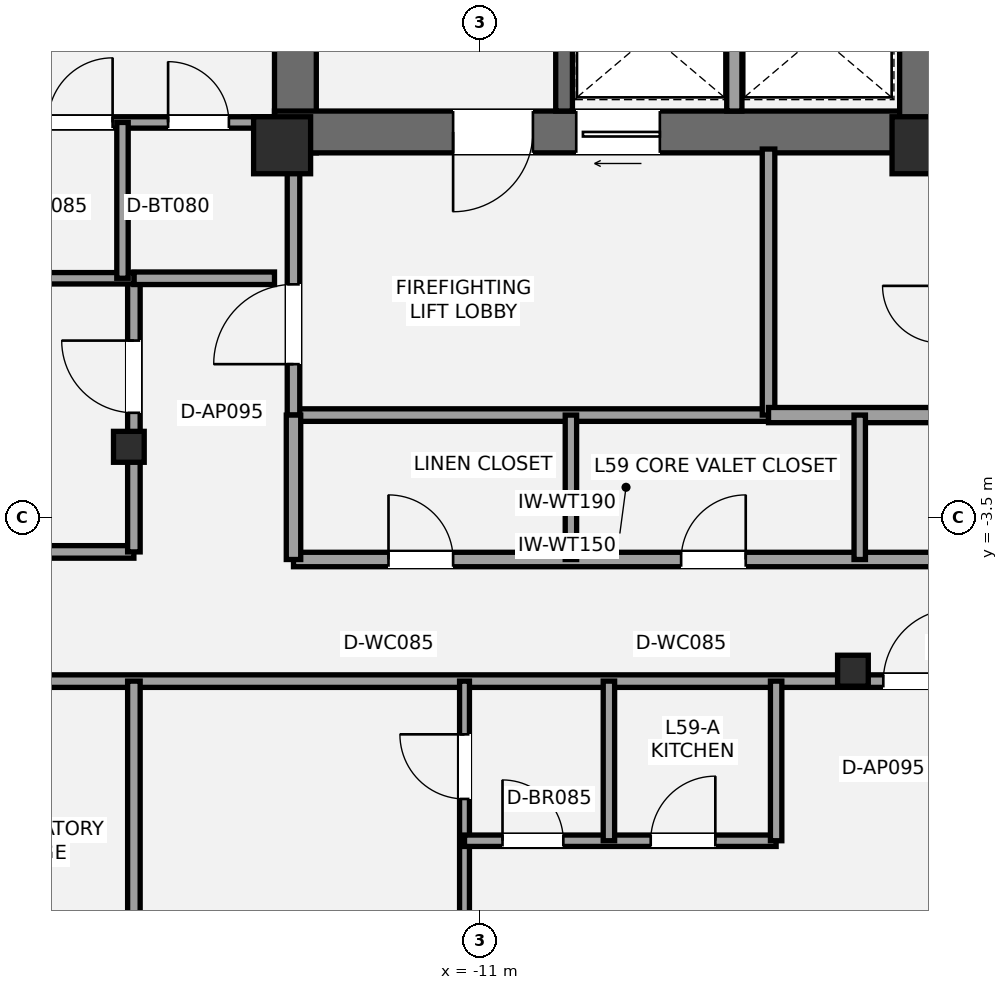
"""IFC4 building model, lengths in metres.
Left out: names, types, materials, properties, quantities, classifications, styles, units other than length and angle.
Written with IfcOpenShell. Run it as: python <this file> out.ifc"""

import sys

from ifc_helpers import new_model, si_unit, direction, frame, frame_2d, origin, origin_2d, place, context, subcontext, project, spatial, rectangle, i_section, extrude, element, fill, save


model = new_model("IFC4")
c1 = context("Model", 3, precision=1e-05, world=origin(), true_north=direction((0.0, 1.0)))
c2 = subcontext(c1, "Body", "Model", "MODEL_VIEW")
j1 = project(units=[si_unit("LENGTHUNIT", "METRE"), si_unit("PLANEANGLEUNIT", "RADIAN")], contexts=[c1])
p1 = place(None, origin())
s1 = spatial("IfcSite", under=j1, at=p1, CompositionType="ELEMENT")
p2 = place(p1, origin())
s2 = spatial("IfcBuilding", under=s1, at=p2, CompositionType="ELEMENT")
p3 = place(p2, frame((0.0, 0.0, 213.15)))
s3 = spatial("IfcBuildingStorey", under=s2, at=p3, CompositionType="ELEMENT", Elevation=213.15)
p4 = place(p3, frame((-13.425, 1.3, 0.0), z_axis=(0.0, 0.0, 1.0), x_axis=(0.0, 1.0, 0.0)))
e1 = element("IfcWall", 1, at=p4, inside=s3, PredefinedType="SHEAR", context=c2, shape_type="SweptSolid", body=[
    extrude(rectangle(XDim=8.25, YDim=0.55, at=frame_2d((4.125, 0.0))), origin(), (0.0, 0.0, 1.0), 3.15),
])
p5 = place(p3, frame((-4.925, 1.575, 0.0), z_axis=(0.0, 0.0, 1.0), x_axis=(-1.0, 0.0, 0.0)))
e2 = element("IfcWall", 2, at=p5, inside=s3, PredefinedType="SHEAR", context=c2, shape_type="SweptSolid", body=[
    extrude(rectangle(XDim=8.775, YDim=0.55, at=frame_2d((4.387, 0.0))), origin(), (0.0, 0.0, 1.0), 3.15),
])
p6 = place(p5, frame((5.375, 0.0, 0.0)))
e3 = element("IfcOpeningElement", 3, at=p6, cuts=e2, PredefinedType="OPENING", context=c2, shape_type="SweptSolid", body=[
    extrude(rectangle(XDim=1.05, YDim=2.15, at=frame_2d((0.525, 1.075))), frame((0.0, 0.285, 0.0), z_axis=(0.0, -1.0, 0.0), x_axis=(1.0, 0.0, 0.0)), (0.0, 0.0, 1.0), 0.57),
])
p7 = place(p5, frame((3.705, 0.0, 0.0)))
e4 = element("IfcOpeningElement", 4, at=p7, cuts=e2, PredefinedType="OPENING", context=c2, shape_type="SweptSolid", body=[
    extrude(rectangle(XDim=1.1, YDim=2.2, at=frame_2d((0.55, 1.1))), frame((0.0, 0.285, 0.0), z_axis=(0.0, -1.0, 0.0), x_axis=(1.0, 0.0, 0.0)), (0.0, 0.0, 1.0), 0.57),
])
p8 = place(p3, frame((-5.2, 1.3, 0.0), z_axis=(0.0, 0.0, 1.0), x_axis=(0.0, 1.0, 0.0)))
e5 = element("IfcWall", 5, at=p8, inside=s3, PredefinedType="SHEAR", context=c2, shape_type="SweptSolid", body=[
    extrude(rectangle(XDim=2.5, YDim=0.55, at=frame_2d((1.25, 0.0))), origin(), (0.0, 0.0, 1.0), 3.15),
])
p9 = place(p3, frame((-9.89, 1.85, 0.0), z_axis=(0.0, 0.0, 1.0), x_axis=(0.0, 1.0, 0.0)))
e6 = element("IfcWall", 6, at=p9, inside=s3, PredefinedType="SHEAR", context=c2, shape_type="SweptSolid", body=[
    extrude(rectangle(XDim=7.15, YDim=0.22, at=frame_2d((3.575, 0.0))), origin(), (0.0, 0.0, 1.0), 3.15),
])
for number, where, z_axis, x_axis in (
    (7, (-13.6, 1.4, 0.0), (0.0, 0.0, 1.0), (1.0, 0.0, 0.0)),
    (8, (-5.2, 1.4, 0.0), (0.0, 0.0, 1.0), (1.0, 0.0, 0.0)),
):
    element("IfcColumn", number, at=place(p3, frame(where, z_axis=z_axis, x_axis=x_axis)), inside=s3, PredefinedType="PILASTER", context=c2, shape_type="SweptSolid", body=[
        extrude(rectangle(XDim=0.75, YDim=0.75, at=origin_2d()), origin(), (0.0, 0.0, 1.0), 3.15),
    ])
for number, where, z_axis, x_axis in (
    (9, (-15.616, -2.567, 0.0), (0.0, 0.0, 1.0), (1.0, 0.0, 0.0)),
    (10, (-6.09, -5.513, 0.0), (0.0, 0.0, 1.0), (1.0, 0.0, 0.0)),
):
    element("IfcColumn", number, at=place(p3, frame(where, z_axis=z_axis, x_axis=x_axis)), inside=s3, PredefinedType="COLUMN", context=c2, shape_type="SweptSolid", body=[
        extrude(i_section(OverallWidth=0.404, OverallDepth=0.407, WebThickness=0.027, FlangeThickness=0.044, at=origin_2d()), origin(), (0.0, 0.0, 1.0), 3.15),
    ])
p10 = place(p3, frame((-13.45, -2.15, 0.0), z_axis=(0.0, 0.0, 1.0), x_axis=(1.0, 0.0, 0.0)))
e11 = element("IfcWall", 11, at=p10, inside=s3, PredefinedType="PARTITIONING", context=c2, shape_type="SweptSolid", body=[
    extrude(rectangle(XDim=6.25, YDim=0.165, at=frame_2d((3.125, 0.0))), origin(), (0.0, 0.0, 1.0), 2.423),
])
p11 = place(p3, frame((-13.45, -2.15, 0.0), z_axis=(0.0, 0.0, 1.0), x_axis=(0.0, 1.0, 0.0)))
e12 = element("IfcWall", 12, at=p11, inside=s3, PredefinedType="PARTITIONING", context=c2, shape_type="SweptSolid", body=[
    extrude(rectangle(XDim=3.5, YDim=0.165, at=frame_2d((1.75, 0.0))), origin(), (0.0, 0.0, 1.0), 2.423),
])
p12 = place(p11, frame((0.67, 0.0, 0.0)))
e13 = element("IfcOpeningElement", 13, at=p12, cuts=e12, PredefinedType="OPENING", context=c2, shape_type="SweptSolid", body=[
    extrude(rectangle(XDim=1.05, YDim=2.15, at=frame_2d((0.525, 1.075))), frame((0.0, 0.093, 0.0), z_axis=(0.0, -1.0, 0.0), x_axis=(1.0, 0.0, 0.0)), (0.0, 0.0, 1.0), 0.185),
])
p13 = place(p3, frame((-7.2, -2.15, 0.0), z_axis=(0.0, 0.0, 1.0), x_axis=(0.0, 1.0, 0.0)))
e14 = element("IfcWall", 14, at=p13, inside=s3, PredefinedType="PARTITIONING", context=c2, shape_type="SweptSolid", body=[
    extrude(rectangle(XDim=3.5, YDim=0.165, at=frame_2d((1.75, 0.0))), origin(), (0.0, 0.0, 1.0), 2.423),
])
p14 = place(p3, frame((-7.2, -2.15, 0.0), z_axis=(0.0, 0.0, 1.0), x_axis=(1.0, 0.0, 0.0)))
e15 = element("IfcWall", 15, at=p14, inside=s3, PredefinedType="SOLIDWALL", context=c2, shape_type="SweptSolid", body=[
    extrude(rectangle(XDim=2.25, YDim=0.2, at=frame_2d((1.125, 0.0))), origin(), (0.0, 0.0, 1.0), 2.423),
])
p15 = place(p3, frame((-7.65, 1.85, 0.0), z_axis=(0.0, 0.0, 1.0), x_axis=(0.0, 1.0, 0.0)))
e16 = element("IfcWall", 16, at=p15, inside=s3, PredefinedType="SOLIDWALL", context=c2, shape_type="SweptSolid", body=[
    extrude(rectangle(XDim=1.93, YDim=0.2, at=frame_2d((0.965, 0.0))), origin(), (0.0, 0.0, 1.0), 2.97),
])
p16 = place(p3, frame((-13.45, -4.05, 0.0), z_axis=(0.0, 0.0, 1.0), x_axis=(1.0, 0.0, 0.0)))
e17 = element("IfcWall", 17, at=p16, inside=s3, PredefinedType="PLUMBINGWALL", context=c2, shape_type="SweptSolid", body=[
    extrude(rectangle(XDim=11.35, YDim=0.19, at=frame_2d((5.675, 0.0))), origin(), (0.0, 0.0, 1.0), 2.357),
])
p17 = place(p16, frame((1.25, 0.0, 0.0)))
e18 = element("IfcOpeningElement", 18, at=p17, cuts=e17, PredefinedType="OPENING", context=c2, shape_type="SweptSolid", body=[
    extrude(rectangle(XDim=0.85, YDim=2.1, at=frame_2d((0.425, 1.05))), frame((0.0, 0.105, 0.0), z_axis=(0.0, -1.0, 0.0), x_axis=(1.0, 0.0, 0.0)), (0.0, 0.0, 1.0), 0.21),
])
p18 = place(p16, frame((5.1, 0.0, 0.0)))
e19 = element("IfcOpeningElement", 19, at=p18, cuts=e17, PredefinedType="OPENING", context=c2, shape_type="SweptSolid", body=[
    extrude(rectangle(XDim=0.85, YDim=2.1, at=frame_2d((0.425, 1.05))), frame((0.0, 0.105, 0.0), z_axis=(0.0, -1.0, 0.0), x_axis=(1.0, 0.0, 0.0)), (0.0, 0.0, 1.0), 0.21),
])
p19 = place(p16, frame((8.95, 0.0, 0.0)))
e20 = element("IfcOpeningElement", 20, at=p19, cuts=e17, PredefinedType="OPENING", context=c2, shape_type="SweptSolid", body=[
    extrude(rectangle(XDim=0.95, YDim=2.15, at=frame_2d((0.475, 1.075))), frame((0.0, 0.105, 0.0), z_axis=(0.0, -1.0, 0.0), x_axis=(1.0, 0.0, 0.0)), (0.0, 0.0, 1.0), 0.21),
])
p20 = place(p3, frame((-13.45, -4.05, 0.0), z_axis=(0.0, 0.0, 1.0), x_axis=(0.0, 1.0, 0.0)))
e21 = element("IfcWall", 21, at=p20, inside=s3, PredefinedType="PLUMBINGWALL", context=c2, shape_type="SweptSolid", body=[
    extrude(rectangle(XDim=1.9, YDim=0.19, at=frame_2d((0.95, 0.0))), origin(), (0.0, 0.0, 1.0), 2.423),
])
p21 = place(p3, frame((-9.8, -4.05, 0.0), z_axis=(0.0, 0.0, 1.0), x_axis=(0.0, 1.0, 0.0)))
e22 = element("IfcWall", 22, at=p21, inside=s3, PredefinedType="PLUMBINGWALL", context=c2, shape_type="SweptSolid", body=[
    extrude(rectangle(XDim=1.9, YDim=0.15, at=frame_2d((0.95, 0.0))), origin(), (0.0, 0.0, 1.0), 2.97),
])
p22 = place(p3, frame((-6.0, -4.05, 0.0), z_axis=(0.0, 0.0, 1.0), x_axis=(0.0, 1.0, 0.0)))
e23 = element("IfcWall", 23, at=p22, inside=s3, PredefinedType="PLUMBINGWALL", context=c2, shape_type="SweptSolid", body=[
    extrude(rectangle(XDim=1.9, YDim=0.15, at=frame_2d((0.95, 0.0))), origin(), (0.0, 0.0, 1.0), 2.423),
])
p23 = place(p3, frame((-20.71, -5.65, 0.0), z_axis=(0.0, 0.0, 1.0), x_axis=(1.0, 0.0, 0.0)))
e24 = element("IfcWall", 24, at=p23, inside=s3, PredefinedType="PARTITIONING", context=c2, shape_type="SweptSolid", body=[
    extrude(rectangle(XDim=41.42, YDim=0.165, at=frame_2d((20.71, 0.0))), origin(), (0.0, 0.0, 1.0), 2.357),
])
p24 = place(p23, frame((1.587, 0.0, 0.0)))
e25 = element("IfcOpeningElement", 25, at=p24, cuts=e24, PredefinedType="OPENING", context=c2, shape_type="SweptSolid", body=[
    extrude(rectangle(XDim=1.0, YDim=2.15, at=frame_2d((0.5, 1.075))), frame((0.0, 0.093, 0.0), z_axis=(0.0, -1.0, 0.0), x_axis=(1.0, 0.0, 0.0)), (0.0, 0.0, 1.0), 0.185),
])
p25 = place(p23, frame((38.833, 0.0, 0.0)))
e26 = element("IfcOpeningElement", 26, at=p25, cuts=e24, PredefinedType="OPENING", context=c2, shape_type="SweptSolid", body=[
    extrude(rectangle(XDim=1.0, YDim=2.15, at=frame_2d((0.5, 1.075))), frame((0.0, 0.093, 0.0), z_axis=(0.0, -1.0, 0.0), x_axis=(1.0, 0.0, 0.0)), (0.0, 0.0, 1.0), 0.185),
])
p26 = place(p23, frame((15.02, 0.0, 0.0)))
e27 = element("IfcOpeningElement", 27, at=p26, cuts=e24, PredefinedType="OPENING", context=c2, shape_type="SweptSolid", body=[
    extrude(rectangle(XDim=0.95, YDim=2.15, at=frame_2d((0.475, 1.075))), frame((0.0, 0.093, 0.0), z_axis=(0.0, -1.0, 0.0), x_axis=(1.0, 0.0, 0.0)), (0.0, 0.0, 1.0), 0.185),
])
p27 = place(p23, frame((28.61, 0.0, 0.0)))
e28 = element("IfcOpeningElement", 28, at=p27, cuts=e24, PredefinedType="OPENING", context=c2, shape_type="SweptSolid", body=[
    extrude(rectangle(XDim=0.95, YDim=2.15, at=frame_2d((0.475, 1.075))), frame((0.0, 0.093, 0.0), z_axis=(0.0, -1.0, 0.0), x_axis=(1.0, 0.0, 0.0)), (0.0, 0.0, 1.0), 0.185),
])
p28 = place(p3, frame((-22.026, -3.95, 0.0), z_axis=(0.0, 0.0, 1.0), x_axis=(1.0, 0.0, 0.0)))
e29 = element("IfcWall", 29, at=p28, inside=s3, PredefinedType="PARTITIONING", context=c2, shape_type="SweptSolid", body=[
    extrude(rectangle(XDim=6.476, YDim=0.165, at=frame_2d((3.238, 0.0))), origin(), (0.0, 0.0, 1.0), 2.423),
])
p29 = place(p3, frame((-15.55, -3.95, 0.0), z_axis=(0.0, 0.0, 1.0), x_axis=(0.0, 1.0, 0.0)))
e30 = element("IfcWall", 30, at=p29, inside=s3, PredefinedType="PARTITIONING", context=c2, shape_type="SweptSolid", body=[
    extrude(rectangle(XDim=3.6, YDim=0.165, at=frame_2d((1.8, 0.0))), origin(), (0.0, 0.0, 1.0), 2.357),
])
p30 = place(p29, frame((1.83, 0.0, 0.0)))
e31 = element("IfcOpeningElement", 31, at=p30, cuts=e30, PredefinedType="OPENING", context=c2, shape_type="SweptSolid", body=[
    extrude(rectangle(XDim=0.95, YDim=2.15, at=frame_2d((0.475, 1.075))), frame((0.0, 0.093, 0.0), z_axis=(0.0, -1.0, 0.0), x_axis=(1.0, 0.0, 0.0)), (0.0, 0.0, 1.0), 0.185),
])
p31 = place(p3, frame((-15.55, -0.35, 0.0), z_axis=(0.0, 0.0, 1.0), x_axis=(1.0, 0.0, 0.0)))
e32 = element("IfcWall", 32, at=p31, inside=s3, PredefinedType="PARTITIONING", context=c2, shape_type="SweptSolid", body=[
    extrude(rectangle(XDim=1.85, YDim=0.165, at=frame_2d((0.925, 0.0))), origin(), (0.0, 0.0, 1.0), 2.423),
])
p32 = place(p3, frame((-15.55, -10.024, 0.0), z_axis=(0.0, 0.0, 1.0), x_axis=(0.0, 1.0, 0.0)))
e33 = element("IfcWall", 33, at=p32, inside=s3, PredefinedType="PARTITIONING", context=c2, shape_type="SweptSolid", body=[
    extrude(rectangle(XDim=4.374, YDim=0.165, at=frame_2d((2.187, 0.0))), origin(), (0.0, 0.0, 1.0), 2.423),
])
p33 = place(p3, frame((-11.2, -12.696, 0.0), z_axis=(0.0, 0.0, 1.0), x_axis=(0.0, 1.0, 0.0)))
e34 = element("IfcWall", 34, at=p33, inside=s3, PredefinedType="PARTITIONING", context=c2, shape_type="SweptSolid", body=[
    extrude(rectangle(XDim=7.046, YDim=0.13, at=frame_2d((3.523, 0.0))), origin(), (0.0, 0.0, 1.0), 2.423),
])
p34 = place(p33, frame((5.496, 0.0, 0.0)))
e35 = element("IfcOpeningElement", 35, at=p34, cuts=e34, PredefinedType="OPENING", context=c2, shape_type="SweptSolid", body=[
    extrude(rectangle(XDim=0.85, YDim=2.1, at=frame_2d((0.425, 1.05))), frame((0.0, 0.075, 0.0), z_axis=(0.0, -1.0, 0.0), x_axis=(1.0, 0.0, 0.0)), (0.0, 0.0, 1.0), 0.15),
])
p35 = place(p3, frame((-11.2, -7.75, 0.0), z_axis=(0.0, 0.0, 1.0), x_axis=(1.0, 0.0, 0.0)))
e36 = element("IfcWall", 36, at=p35, inside=s3, PredefinedType="PLUMBINGWALL", context=c2, shape_type="SweptSolid", body=[
    extrude(rectangle(XDim=4.1, YDim=0.15, at=frame_2d((2.05, 0.0))), origin(), (0.0, 0.0, 1.0), 2.423),
])
p36 = place(p35, frame((0.5, 0.0, 0.0)))
e37 = element("IfcOpeningElement", 37, at=p36, cuts=e36, PredefinedType="OPENING", context=c2, shape_type="SweptSolid", body=[
    extrude(rectangle(XDim=0.8, YDim=2.1, at=frame_2d((0.4, 1.05))), frame((0.0, 0.085, 0.0), z_axis=(0.0, -1.0, 0.0), x_axis=(1.0, 0.0, 0.0)), (0.0, 0.0, 1.0), 0.17),
])
p37 = place(p35, frame((2.45, 0.0, 0.0)))
e38 = element("IfcOpeningElement", 38, at=p37, cuts=e36, PredefinedType="OPENING", context=c2, shape_type="SweptSolid", body=[
    extrude(rectangle(XDim=0.85, YDim=2.1, at=frame_2d((0.425, 1.05))), frame((0.0, 0.085, 0.0), z_axis=(0.0, -1.0, 0.0), x_axis=(1.0, 0.0, 0.0)), (0.0, 0.0, 1.0), 0.17),
])
p38 = place(p3, frame((-9.3, -7.75, 0.0), z_axis=(0.0, 0.0, 1.0), x_axis=(0.0, 1.0, 0.0)))
e39 = element("IfcWall", 39, at=p38, inside=s3, PredefinedType="PLUMBINGWALL", context=c2, shape_type="SweptSolid", body=[
    extrude(rectangle(XDim=2.1, YDim=0.15, at=frame_2d((1.05, 0.0))), origin(), (0.0, 0.0, 1.0), 2.97),
])
p39 = place(p3, frame((-7.1, -7.75, 0.0), z_axis=(0.0, 0.0, 1.0), x_axis=(0.0, 1.0, 0.0)))
e40 = element("IfcWall", 40, at=p39, inside=s3, PredefinedType="PLUMBINGWALL", context=c2, shape_type="SweptSolid", body=[
    extrude(rectangle(XDim=2.1, YDim=0.15, at=frame_2d((1.05, 0.0))), origin(), (0.0, 0.0, 1.0), 2.423),
])
p40 = place(p3, frame((-17.95, 1.7, 0.0), z_axis=(0.0, 0.0, 1.0), x_axis=(1.0, 0.0, 0.0)))
e41 = element("IfcWall", 41, at=p40, inside=s3, PredefinedType="PLUMBINGWALL", context=c2, shape_type="SweptSolid", body=[
    extrude(rectangle(XDim=4.25, YDim=0.15, at=frame_2d((2.125, 0.0))), origin(), (0.0, 0.0, 1.0), 2.423),
])
p41 = place(p40, frame((2.85, 0.0, 0.0)))
e42 = element("IfcOpeningElement", 42, at=p41, cuts=e41, PredefinedType="OPENING", context=c2, shape_type="SweptSolid", body=[
    extrude(rectangle(XDim=0.8, YDim=2.1, at=frame_2d((0.4, 1.05))), frame((0.0, 0.085, 0.0), z_axis=(0.0, -1.0, 0.0), x_axis=(1.0, 0.0, 0.0)), (0.0, 0.0, 1.0), 0.17),
])
p42 = place(p40, frame((1.27, 0.0, 0.0)))
e43 = element("IfcOpeningElement", 43, at=p42, cuts=e41, PredefinedType="OPENING", context=c2, shape_type="SweptSolid", body=[
    extrude(rectangle(XDim=0.85, YDim=2.1, at=frame_2d((0.425, 1.05))), frame((0.0, 0.085, 0.0), z_axis=(0.0, -1.0, 0.0), x_axis=(1.0, 0.0, 0.0)), (0.0, 0.0, 1.0), 0.17),
])
p43 = place(p3, frame((-17.95, -0.35, 0.0), z_axis=(0.0, 0.0, 1.0), x_axis=(1.0, 0.0, 0.0)))
e44 = element("IfcWall", 44, at=p43, inside=s3, PredefinedType="PLUMBINGWALL", context=c2, shape_type="SweptSolid", body=[
    extrude(rectangle(XDim=2.4, YDim=0.15, at=frame_2d((1.2, 0.0))), origin(), (0.0, 0.0, 1.0), 2.423),
])
p44 = place(p3, frame((-15.7, -0.35, 0.0), z_axis=(0.0, 0.0, 1.0), x_axis=(0.0, 1.0, 0.0)))
e45 = element("IfcWall", 45, at=p44, inside=s3, PredefinedType="PLUMBINGWALL", context=c2, shape_type="SweptSolid", body=[
    extrude(rectangle(XDim=2.05, YDim=0.15, at=frame_2d((1.025, 0.0))), origin(), (0.0, 0.0, 1.0), 2.97),
])
p45 = place(p6, origin())
e46 = element("IfcDoor", 46, at=p45, inside=s3, OperationType="SINGLE_SWING_RIGHT", PredefinedType="DOOR", context=c2, shape_type="SweptSolid", body=[
    extrude(rectangle(XDim=1.05, YDim=2.15, at=frame_2d((0.525, 1.075))), frame((0.0, 0.025, 0.0), z_axis=(0.0, -1.0, 0.0), x_axis=(1.0, 0.0, 0.0)), (0.0, 0.0, 1.0), 0.05),
])
fill(e3, e46)
p46 = place(p12, origin())
e47 = element("IfcDoor", 47, at=p46, inside=s3, OperationType="SINGLE_SWING_LEFT", PredefinedType="DOOR", context=c2, shape_type="SweptSolid", body=[
    extrude(rectangle(XDim=1.05, YDim=2.15, at=frame_2d((0.525, 1.075))), frame((0.0, 0.025, 0.0), z_axis=(0.0, -1.0, 0.0), x_axis=(1.0, 0.0, 0.0)), (0.0, 0.0, 1.0), 0.05),
])
fill(e13, e47)
p47 = place(p7, origin())
e48 = element("IfcDoor", 48, at=p47, inside=s3, OperationType="SLIDING_TO_LEFT", PredefinedType="DOOR", context=c2, shape_type="SweptSolid", body=[
    extrude(rectangle(XDim=1.1, YDim=2.2, at=frame_2d((0.55, 1.1))), frame((0.0, 0.025, 0.0), z_axis=(0.0, -1.0, 0.0), x_axis=(1.0, 0.0, 0.0)), (0.0, 0.0, 1.0), 0.05),
])
fill(e4, e48)
p48 = place(p17, origin())
e49 = element("IfcDoor", 49, at=p48, inside=s3, OperationType="SINGLE_SWING_LEFT", PredefinedType="DOOR", context=c2, shape_type="SweptSolid", body=[
    extrude(rectangle(XDim=0.85, YDim=2.1, at=frame_2d((0.425, 1.05))), frame((0.0, 0.025, 0.0), z_axis=(0.0, -1.0, 0.0), x_axis=(1.0, 0.0, 0.0)), (0.0, 0.0, 1.0), 0.05),
])
fill(e18, e49)
p49 = place(p18, origin())
e50 = element("IfcDoor", 50, at=p49, inside=s3, OperationType="SINGLE_SWING_RIGHT", PredefinedType="DOOR", context=c2, shape_type="SweptSolid", body=[
    extrude(rectangle(XDim=0.85, YDim=2.1, at=frame_2d((0.425, 1.05))), frame((0.0, 0.025, 0.0), z_axis=(0.0, -1.0, 0.0), x_axis=(1.0, 0.0, 0.0)), (0.0, 0.0, 1.0), 0.05),
])
fill(e19, e50)
p50 = place(p34, origin())
e51 = element("IfcDoor", 51, at=p50, inside=s3, OperationType="SINGLE_SWING_RIGHT", PredefinedType="DOOR", context=c2, shape_type="SweptSolid", body=[
    extrude(rectangle(XDim=0.85, YDim=2.1, at=frame_2d((0.425, 1.05))), frame((0.0, 0.025, 0.0), z_axis=(0.0, -1.0, 0.0), x_axis=(1.0, 0.0, 0.0)), (0.0, 0.0, 1.0), 0.05),
])
fill(e35, e51)
p51 = place(p36, origin())
e52 = element("IfcDoor", 52, at=p51, inside=s3, OperationType="SINGLE_SWING_LEFT", PredefinedType="DOOR", context=c2, shape_type="SweptSolid", body=[
    extrude(rectangle(XDim=0.8, YDim=2.1, at=frame_2d((0.4, 1.05))), frame((0.0, 0.025, 0.0), z_axis=(0.0, -1.0, 0.0), x_axis=(1.0, 0.0, 0.0)), (0.0, 0.0, 1.0), 0.05),
])
fill(e37, e52)
p52 = place(p37, origin())
e53 = element("IfcDoor", 53, at=p52, inside=s3, OperationType="SINGLE_SWING_RIGHT", PredefinedType="DOOR", context=c2, shape_type="SweptSolid", body=[
    extrude(rectangle(XDim=0.85, YDim=2.1, at=frame_2d((0.425, 1.05))), frame((0.0, 0.025, 0.0), z_axis=(0.0, -1.0, 0.0), x_axis=(1.0, 0.0, 0.0)), (0.0, 0.0, 1.0), 0.05),
])
fill(e38, e53)
p53 = place(p26, origin())
e54 = element("IfcDoor", 54, at=p53, inside=s3, OperationType="SINGLE_SWING_RIGHT", PredefinedType="DOOR", context=c2, shape_type="SweptSolid", body=[
    extrude(rectangle(XDim=0.95, YDim=2.15, at=frame_2d((0.475, 1.075))), frame((0.0, 0.025, 0.0), z_axis=(0.0, -1.0, 0.0), x_axis=(1.0, 0.0, 0.0)), (0.0, 0.0, 1.0), 0.05),
])
fill(e27, e54)
p54 = place(p30, origin())
e55 = element("IfcDoor", 55, at=p54, inside=s3, OperationType="SINGLE_SWING_RIGHT", PredefinedType="DOOR", context=c2, shape_type="SweptSolid", body=[
    extrude(rectangle(XDim=0.95, YDim=2.15, at=frame_2d((0.475, 1.075))), frame((0.0, 0.025, 0.0), z_axis=(0.0, -1.0, 0.0), x_axis=(1.0, 0.0, 0.0)), (0.0, 0.0, 1.0), 0.05),
])
fill(e31, e55)
p55 = place(p41, origin())
e56 = element("IfcDoor", 56, at=p55, inside=s3, OperationType="SINGLE_SWING_LEFT", PredefinedType="DOOR", context=c2, shape_type="SweptSolid", body=[
    extrude(rectangle(XDim=0.8, YDim=2.1, at=frame_2d((0.4, 1.05))), frame((0.0, 0.025, 0.0), z_axis=(0.0, -1.0, 0.0), x_axis=(1.0, 0.0, 0.0)), (0.0, 0.0, 1.0), 0.05),
])
fill(e42, e56)
p56 = place(p42, origin())
e57 = element("IfcDoor", 57, at=p56, inside=s3, OperationType="SINGLE_SWING_RIGHT", PredefinedType="DOOR", context=c2, shape_type="SweptSolid", body=[
    extrude(rectangle(XDim=0.85, YDim=2.1, at=frame_2d((0.425, 1.05))), frame((0.0, 0.025, 0.0), z_axis=(0.0, -1.0, 0.0), x_axis=(1.0, 0.0, 0.0)), (0.0, 0.0, 1.0), 0.05),
])
fill(e43, e57)
save(model, sys.argv[1])
